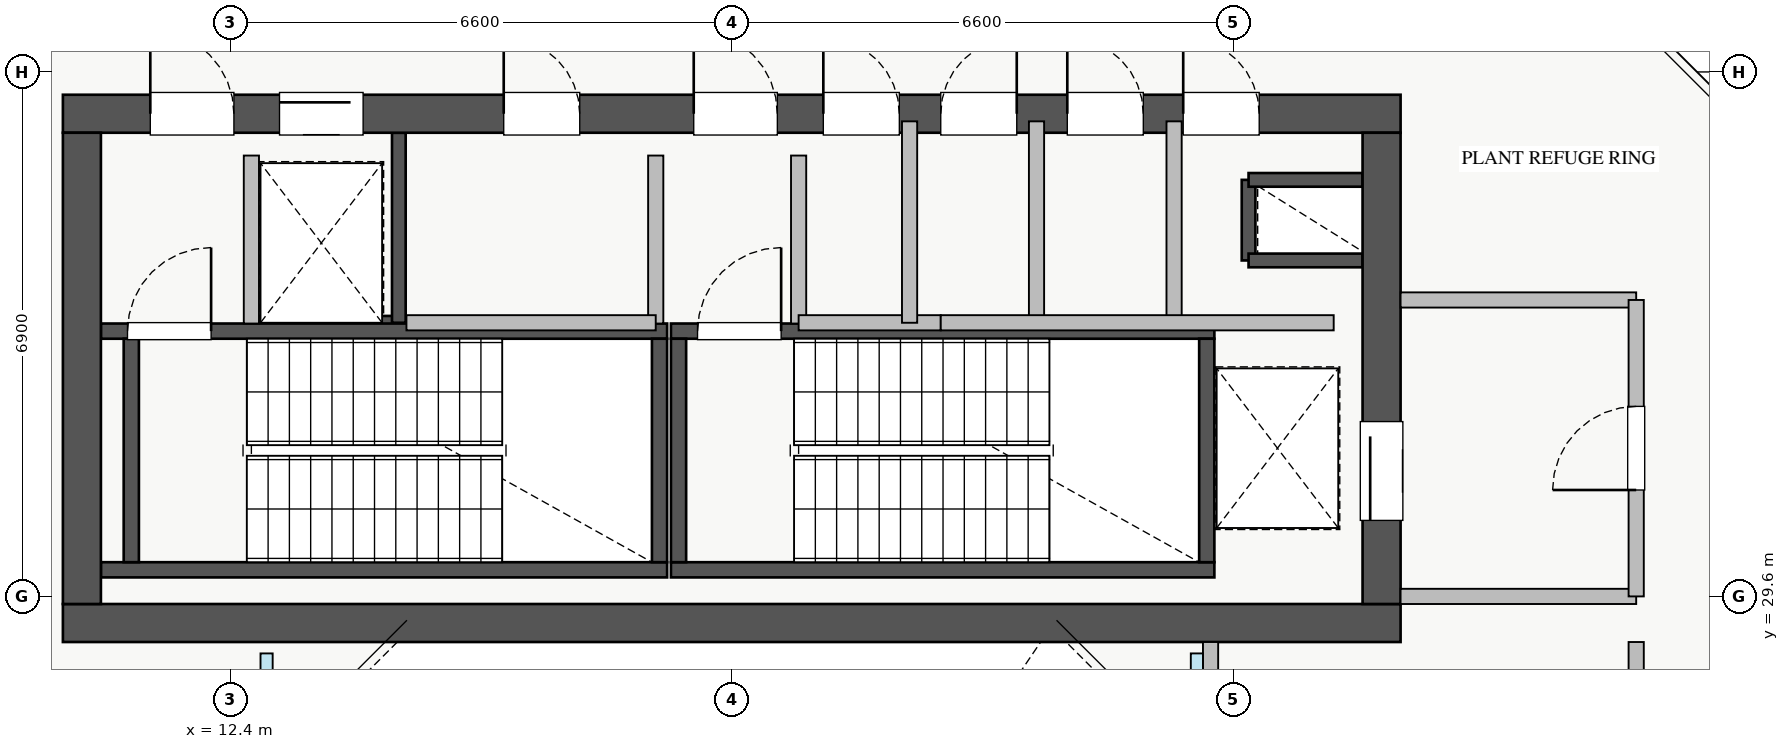
"""IFC4 building model, lengths in metres.
Left out: names, types, materials, properties, quantities, classifications, styles, units other than length and angle.
Written with IfcOpenShell. Run it as: python <this file> out.ifc"""

import sys

from ifc_helpers import new_model, si_unit, direction, frame, frame_2d, origin, place, context, subcontext, project, spatial, rectangle, extrude, source, transform, mapped, element, fill, save


model = new_model("IFC4")
c1 = context("Model", 3, precision=1e-05, world=origin(), true_north=direction((0.0, 1.0)))
c2 = subcontext(c1, "Body", "Model", "MODEL_VIEW")
j1 = project(units=[si_unit("LENGTHUNIT", "METRE"), si_unit("PLANEANGLEUNIT", "RADIAN")], contexts=[c1])
p1 = place(None, origin())
s1 = spatial("IfcSite", under=j1, at=p1, CompositionType="ELEMENT")
p2 = place(p1, origin())
s2 = spatial("IfcBuilding", under=s1, at=p2, CompositionType="ELEMENT")
p3 = place(p2, frame((0.0, 0.0, 232.75)))
s3 = spatial("IfcBuildingStorey", under=s2, at=p3, CompositionType="ELEMENT", Elevation=232.75)
p4 = place(p3, frame((12.68, 33.2, 0.0), z_axis=(0.0, 0.0, 1.0), x_axis=(1.0, 0.0, 0.0)))
e1 = element("IfcWall", 1, at=p4, inside=s3, PredefinedType="SHEAR", context=c2, shape_type="SweptSolid", body=[
    extrude(rectangle(XDim=1.94, YDim=0.18, at=frame_2d((0.97, 0.0))), origin(), (0.0, 0.0, 1.0), 4.32),
])
p5 = place(p3, frame((14.62, 33.2, 0.0), z_axis=(0.0, 0.0, 1.0), x_axis=(0.0, 1.0, 0.0)))
e2 = element("IfcWall", 2, at=p5, inside=s3, PredefinedType="SHEAR", context=c2, shape_type="SweptSolid", body=[
    extrude(rectangle(XDim=2.5, YDim=0.18, at=frame_2d((1.25, 0.0))), origin(), (0.0, 0.0, 1.0), 4.32),
])
p6 = place(p3, frame((25.8, 34.02, 0.0), z_axis=(0.0, 0.0, 1.0), x_axis=(0.0, 1.0, 0.0)))
e3 = element("IfcWall", 3, at=p6, inside=s3, PredefinedType="SHEAR", context=c2, shape_type="SweptSolid", body=[
    extrude(rectangle(XDim=1.06, YDim=0.18, at=frame_2d((0.53, 0.0))), origin(), (0.0, 0.0, 1.0), 4.32),
])
for number, where, z_axis, x_axis in (
    (4, (25.8, 35.08, 0.0), (0.0, 0.0, 1.0), (1.0, 0.0, 0.0)),
    (5, (25.8, 34.02, 0.0), (0.0, 0.0, 1.0), (1.0, 0.0, 0.0)),
):
    element("IfcWall", number, at=place(p3, frame(where, z_axis=z_axis, x_axis=x_axis)), inside=s3, PredefinedType="SHEAR", context=c2, shape_type="SweptSolid", body=[
        extrude(rectangle(XDim=1.5, YDim=0.18, at=frame_2d((0.75, 0.0))), origin(), (0.0, 0.0, 1.0), 4.32),
    ])
p7 = place(p3, frame((10.7, 29.95, 0.0), z_axis=(0.0, 0.0, 1.0), x_axis=(1.0, 0.0, 0.0)))
e6 = element("IfcWall", 6, at=p7, inside=s3, PredefinedType="SHEAR", context=c2, shape_type="SweptSolid", body=[
    extrude(rectangle(XDim=7.45, YDim=0.2, at=frame_2d((3.725, 0.0))), origin(), (0.0, 0.0, 1.0), 4.5),
])
p8 = place(p3, frame((10.7, 33.09, 0.0), z_axis=(0.0, 0.0, 1.0), x_axis=(1.0, 0.0, 0.0)))
e7 = element("IfcWall", 7, at=p8, inside=s3, PredefinedType="SHEAR", context=c2, shape_type="SweptSolid", body=[
    extrude(rectangle(XDim=7.45, YDim=0.2, at=frame_2d((3.725, 0.0))), origin(), (0.0, 0.0, 1.0), 4.5),
])
p9 = place(p8, frame((0.35, 0.0, 0.0)))
e8 = element("IfcOpeningElement", 8, at=p9, cuts=e7, PredefinedType="OPENING", context=c2, shape_type="SweptSolid", body=[
    extrude(rectangle(XDim=1.1, YDim=2.05, at=frame_2d((0.55, 1.025))), frame((0.0, 0.11, 0.0), z_axis=(0.0, -1.0, 0.0), x_axis=(1.0, 0.0, 0.0)), (0.0, 0.0, 1.0), 0.22),
])
for number, where, z_axis, x_axis in (
    (9, (11.1, 30.05, 0.0), (0.0, 0.0, 1.0), (0.0, 1.0, 0.0)),
    (10, (18.05, 30.05, 0.0), (0.0, 0.0, 1.0), (0.0, 1.0, 0.0)),
):
    element("IfcWall", number, at=place(p3, frame(where, z_axis=z_axis, x_axis=x_axis)), inside=s3, PredefinedType="SHEAR", context=c2, shape_type="SweptSolid", body=[
        extrude(rectangle(XDim=2.94, YDim=0.2, at=frame_2d((1.47, 0.0))), origin(), (0.0, 0.0, 1.0), 4.5),
    ])
p10 = place(p3, frame((18.2, 29.95, 0.0), z_axis=(0.0, 0.0, 1.0), x_axis=(1.0, 0.0, 0.0)))
e11 = element("IfcWall", 11, at=p10, inside=s3, PredefinedType="SHEAR", context=c2, shape_type="SweptSolid", body=[
    extrude(rectangle(XDim=7.15, YDim=0.2, at=frame_2d((3.575, 0.0))), origin(), (0.0, 0.0, 1.0), 4.5),
])
p11 = place(p3, frame((18.2, 33.09, 0.0), z_axis=(0.0, 0.0, 1.0), x_axis=(1.0, 0.0, 0.0)))
e12 = element("IfcWall", 12, at=p11, inside=s3, PredefinedType="SHEAR", context=c2, shape_type="SweptSolid", body=[
    extrude(rectangle(XDim=7.15, YDim=0.2, at=frame_2d((3.575, 0.0))), origin(), (0.0, 0.0, 1.0), 4.5),
])
p12 = place(p11, frame((0.35, 0.0, 0.0)))
e13 = element("IfcOpeningElement", 13, at=p12, cuts=e12, PredefinedType="OPENING", context=c2, shape_type="SweptSolid", body=[
    extrude(rectangle(XDim=1.1, YDim=2.05, at=frame_2d((0.55, 1.025))), frame((0.0, 0.11, 0.0), z_axis=(0.0, -1.0, 0.0), x_axis=(1.0, 0.0, 0.0)), (0.0, 0.0, 1.0), 0.22),
])
for number, where, z_axis, x_axis in (
    (14, (18.3, 30.05, 0.0), (0.0, 0.0, 1.0), (0.0, 1.0, 0.0)),
    (15, (25.25, 30.05, 0.0), (0.0, 0.0, 1.0), (0.0, 1.0, 0.0)),
):
    element("IfcWall", number, at=place(p3, frame(where, z_axis=z_axis, x_axis=x_axis)), inside=s3, PredefinedType="SHEAR", context=c2, shape_type="SweptSolid", body=[
        extrude(rectangle(XDim=2.94, YDim=0.2, at=frame_2d((1.47, 0.0))), origin(), (0.0, 0.0, 1.0), 4.5),
    ])
p13 = place(p3, frame((10.2, 29.25, 0.0), z_axis=(0.0, 0.0, 1.0), x_axis=(1.0, 0.0, 0.0)))
e16 = element("IfcWall", 16, at=p13, inside=s3, PredefinedType="SHEAR", context=c2, shape_type="SweptSolid", body=[
    extrude(rectangle(XDim=17.6, YDim=0.5, at=frame_2d((8.8, 0.0))), origin(), (0.0, 0.0, 1.0), 4.5),
])
p14 = place(p3, frame((10.2, 35.95, 0.0), z_axis=(0.0, 0.0, 1.0), x_axis=(1.0, 0.0, 0.0)))
e17 = element("IfcWall", 17, at=p14, inside=s3, PredefinedType="SHEAR", context=c2, shape_type="SweptSolid", body=[
    extrude(rectangle(XDim=17.6, YDim=0.5, at=frame_2d((8.8, 0.0))), origin(), (0.0, 0.0, 1.0), 4.5),
])
p15 = place(p14, frame((1.15, 0.0, 0.0)))
e18 = element("IfcOpeningElement", 18, at=p15, cuts=e17, PredefinedType="OPENING", context=c2, shape_type="SweptSolid", body=[
    extrude(rectangle(XDim=1.1, YDim=2.05, at=frame_2d((0.55, 1.025))), frame((0.0, 0.26, 0.0), z_axis=(0.0, -1.0, 0.0), x_axis=(1.0, 0.0, 0.0)), (0.0, 0.0, 1.0), 0.52),
])
p16 = place(p14, frame((8.3, 0.0, 0.0)))
e19 = element("IfcOpeningElement", 19, at=p16, cuts=e17, PredefinedType="OPENING", context=c2, shape_type="SweptSolid", body=[
    extrude(rectangle(XDim=1.1, YDim=2.05, at=frame_2d((0.55, 1.025))), frame((0.0, 0.26, 0.0), z_axis=(0.0, -1.0, 0.0), x_axis=(1.0, 0.0, 0.0)), (0.0, 0.0, 1.0), 0.52),
])
p17 = place(p14, frame((2.85, 0.0, 0.0)))
e20 = element("IfcOpeningElement", 20, at=p17, cuts=e17, PredefinedType="OPENING", context=c2, shape_type="SweptSolid", body=[
    extrude(rectangle(XDim=1.1, YDim=2.05, at=frame_2d((0.55, 1.025))), frame((0.0, 0.26, 0.0), z_axis=(0.0, -1.0, 0.0), x_axis=(1.0, 0.0, 0.0)), (0.0, 0.0, 1.0), 0.52),
])
p18 = place(p14, frame((5.8, 0.0, 0.0)))
e21 = element("IfcOpeningElement", 21, at=p18, cuts=e17, PredefinedType="OPENING", context=c2, shape_type="SweptSolid", body=[
    extrude(rectangle(XDim=1.0, YDim=2.05, at=frame_2d((0.5, 1.025))), frame((0.0, 0.26, 0.0), z_axis=(0.0, -1.0, 0.0), x_axis=(1.0, 0.0, 0.0)), (0.0, 0.0, 1.0), 0.52),
])
p19 = place(p14, frame((14.74, 0.0, 0.0)))
e22 = element("IfcOpeningElement", 22, at=p19, cuts=e17, PredefinedType="OPENING", context=c2, shape_type="SweptSolid", body=[
    extrude(rectangle(XDim=1.0, YDim=2.05, at=frame_2d((0.5, 1.025))), frame((0.0, 0.26, 0.0), z_axis=(0.0, -1.0, 0.0), x_axis=(1.0, 0.0, 0.0)), (0.0, 0.0, 1.0), 0.52),
])
p20 = place(p14, frame((10.005, 0.0, 0.0)))
e23 = element("IfcOpeningElement", 23, at=p20, cuts=e17, PredefinedType="OPENING", context=c2, shape_type="SweptSolid", body=[
    extrude(rectangle(XDim=1.0, YDim=2.05, at=frame_2d((0.5, 1.025))), frame((0.0, 0.26, 0.0), z_axis=(0.0, -1.0, 0.0), x_axis=(1.0, 0.0, 0.0)), (0.0, 0.0, 1.0), 0.52),
])
p21 = place(p14, frame((11.55, 0.0, 0.0)))
e24 = element("IfcOpeningElement", 24, at=p21, cuts=e17, PredefinedType="OPENING", context=c2, shape_type="SweptSolid", body=[
    extrude(rectangle(XDim=1.0, YDim=2.05, at=frame_2d((0.5, 1.025))), frame((0.0, 0.26, 0.0), z_axis=(0.0, -1.0, 0.0), x_axis=(1.0, 0.0, 0.0)), (0.0, 0.0, 1.0), 0.52),
])
p22 = place(p14, frame((13.215, 0.0, 0.0)))
e25 = element("IfcOpeningElement", 25, at=p22, cuts=e17, PredefinedType="OPENING", context=c2, shape_type="SweptSolid", body=[
    extrude(rectangle(XDim=1.0, YDim=2.05, at=frame_2d((0.5, 1.025))), frame((0.0, 0.26, 0.0), z_axis=(0.0, -1.0, 0.0), x_axis=(1.0, 0.0, 0.0)), (0.0, 0.0, 1.0), 0.52),
])
p23 = place(p3, frame((10.45, 29.5, 0.0), z_axis=(0.0, 0.0, 1.0), x_axis=(0.0, 1.0, 0.0)))
e26 = element("IfcWall", 26, at=p23, inside=s3, PredefinedType="SHEAR", context=c2, shape_type="SweptSolid", body=[
    extrude(rectangle(XDim=6.2, YDim=0.5, at=frame_2d((3.1, 0.0))), origin(), (0.0, 0.0, 1.0), 4.5),
])
p24 = place(p3, frame((27.55, 29.5, 0.0), z_axis=(0.0, 0.0, 1.0), x_axis=(0.0, 1.0, 0.0)))
e27 = element("IfcWall", 27, at=p24, inside=s3, PredefinedType="SHEAR", context=c2, shape_type="SweptSolid", body=[
    extrude(rectangle(XDim=6.2, YDim=0.5, at=frame_2d((3.1, 0.0))), origin(), (0.0, 0.0, 1.0), 4.5),
])
p25 = place(p24, frame((1.1, 0.0, 0.0)))
e28 = element("IfcOpeningElement", 28, at=p25, cuts=e27, PredefinedType="OPENING", context=c2, shape_type="SweptSolid", body=[
    extrude(rectangle(XDim=1.3, YDim=2.05, at=frame_2d((0.65, 1.025))), frame((0.0, 0.26, 0.0), z_axis=(0.0, -1.0, 0.0), x_axis=(1.0, 0.0, 0.0)), (0.0, 0.0, 1.0), 0.52),
])
p26 = place(p3, frame((27.8, 29.6, 0.0), z_axis=(0.0, 0.0, 1.0), x_axis=(1.0, 0.0, 0.0)))
e29 = element("IfcWall", 29, at=p26, inside=s3, PredefinedType="PARTITIONING", context=c2, shape_type="SweptSolid", body=[
    extrude(rectangle(XDim=3.1, YDim=0.2, at=frame_2d((1.55, 0.0))), origin(), (0.0, 0.0, 1.0), 4.32),
])
p27 = place(p3, frame((27.8, 33.5, 0.0), z_axis=(0.0, 0.0, 1.0), x_axis=(1.0, 0.0, 0.0)))
e30 = element("IfcWall", 30, at=p27, inside=s3, PredefinedType="PARTITIONING", context=c2, shape_type="SweptSolid", body=[
    extrude(rectangle(XDim=3.1, YDim=0.2, at=frame_2d((1.55, 0.0))), origin(), (0.0, 0.0, 1.0), 2.515),
])
p28 = place(p3, frame((30.9, 29.6, 0.0), z_axis=(0.0, 0.0, 1.0), x_axis=(0.0, 1.0, 0.0)))
e31 = element("IfcWall", 31, at=p28, inside=s3, PredefinedType="PARTITIONING", context=c2, shape_type="SweptSolid", body=[
    extrude(rectangle(XDim=3.9, YDim=0.2, at=frame_2d((1.95, 0.0))), origin(), (0.0, 0.0, 1.0), 4.32),
])
p29 = place(p28, frame((1.4, 0.0, 0.0)))
e32 = element("IfcOpeningElement", 32, at=p29, cuts=e31, PredefinedType="OPENING", context=c2, shape_type="SweptSolid", body=[
    extrude(rectangle(XDim=1.1, YDim=2.05, at=frame_2d((0.55, 1.025))), frame((0.0, 0.11, 0.0), z_axis=(0.0, -1.0, 0.0), x_axis=(1.0, 0.0, 0.0)), (0.0, 0.0, 1.0), 0.22),
])
for number, where, z_axis, x_axis in (
    (33, (12.68, 33.19, 0.0), (0.0, 0.0, 1.0), (0.0, 1.0, 0.0)),
    (34, (18.0, 33.19, 0.0), (0.0, 0.0, 1.0), (0.0, 1.0, 0.0)),
    (35, (19.88, 33.19, 0.0), (0.0, 0.0, 1.0), (0.0, 1.0, 0.0)),
):
    element("IfcWall", number, at=place(p3, frame(where, z_axis=z_axis, x_axis=x_axis)), inside=s3, PredefinedType="PARTITIONING", context=c2, shape_type="SweptSolid", body=[
        extrude(rectangle(XDim=2.21, YDim=0.2, at=frame_2d((1.105, 0.0))), origin(), (0.0, 0.0, 1.0), 4.32),
    ])
p30 = place(p3, frame((14.72, 33.2, 0.0), z_axis=(0.0, 0.0, 1.0), x_axis=(1.0, 0.0, 0.0)))
e36 = element("IfcWall", 36, at=p30, inside=s3, PredefinedType="PARTITIONING", context=c2, shape_type="SweptSolid", body=[
    extrude(rectangle(XDim=3.28, YDim=0.2, at=frame_2d((1.64, 0.0))), origin(), (0.0, 0.0, 1.0), 4.32),
])
p31 = place(p3, frame((24.82, 33.2, 0.0), z_axis=(0.0, 0.0, 1.0), x_axis=(0.0, 1.0, 0.0)))
e37 = element("IfcWall", 37, at=p31, inside=s3, PredefinedType="PARTITIONING", context=c2, shape_type="SweptSolid", body=[
    extrude(rectangle(XDim=2.65, YDim=0.2, at=frame_2d((1.325, 0.0))), origin(), (0.0, 0.0, 1.0), 4.32),
])
p32 = place(p3, frame((19.88, 33.2, 0.0), z_axis=(0.0, 0.0, 1.0), x_axis=(1.0, 0.0, 0.0)))
e38 = element("IfcWall", 38, at=p32, inside=s3, PredefinedType="PARTITIONING", context=c2, shape_type="SweptSolid", body=[
    extrude(rectangle(XDim=1.87, YDim=0.2, at=frame_2d((0.935, 0.0))), origin(), (0.0, 0.0, 1.0), 4.32),
])
for number, where, z_axis, x_axis in (
    (39, (21.34, 33.2, 0.0), (0.0, 0.0, 1.0), (0.0, 1.0, 0.0)),
    (40, (23.01, 33.2, 0.0), (0.0, 0.0, 1.0), (0.0, 1.0, 0.0)),
):
    element("IfcWall", number, at=place(p3, frame(where, z_axis=z_axis, x_axis=x_axis)), inside=s3, PredefinedType="PARTITIONING", context=c2, shape_type="SweptSolid", body=[
        extrude(rectangle(XDim=2.65, YDim=0.2, at=frame_2d((1.325, 0.0))), origin(), (0.0, 0.0, 1.0), 4.32),
    ])
p33 = place(p3, frame((21.75, 33.2, 0.0), z_axis=(0.0, 0.0, 1.0), x_axis=(1.0, 0.0, 0.0)))
e41 = element("IfcWall", 41, at=p33, inside=s3, PredefinedType="PARTITIONING", context=c2, shape_type="SweptSolid", body=[
    extrude(rectangle(XDim=5.17, YDim=0.2, at=frame_2d((2.585, 0.0))), origin(), (0.0, 0.0, 1.0), 4.32),
])
p34 = place(p3, frame((25.3, 17.0, 0.0), z_axis=(0.0, 0.0, 1.0), x_axis=(0.0, 1.0, 0.0)))
e42 = element("IfcWall", 42, at=p34, inside=s3, PredefinedType="PARTITIONING", context=c2, shape_type="SweptSolid", body=[
    extrude(rectangle(XDim=12.0, YDim=0.2, at=frame_2d((6.0, 0.0))), origin(), (0.0, 0.0, 1.0), 2.515),
])
p35 = place(p3, frame((30.9, 17.0, 0.0), z_axis=(0.0, 0.0, 1.0), x_axis=(0.0, 1.0, 0.0)))
e43 = element("IfcWall", 43, at=p35, inside=s3, PredefinedType="PARTITIONING", context=c2, shape_type="SweptSolid", body=[
    extrude(rectangle(XDim=12.0, YDim=0.2, at=frame_2d((6.0, 0.0))), origin(), (0.0, 0.0, 1.0), 4.32),
])
p36 = place(p35, frame((1.25, 0.0, 0.0)))
e44 = element("IfcOpeningElement", 44, at=p36, cuts=e43, PredefinedType="OPENING", context=c2, shape_type="SweptSolid", body=[
    extrude(rectangle(XDim=1.0, YDim=2.05, at=frame_2d((0.5, 1.025))), frame((0.0, 0.11, 0.0), z_axis=(0.0, -1.0, 0.0), x_axis=(1.0, 0.0, 0.0)), (0.0, 0.0, 1.0), 0.22),
])
p37 = place(p35, frame((7.25, 0.0, 0.0)))
e45 = element("IfcOpeningElement", 45, at=p37, cuts=e43, PredefinedType="OPENING", context=c2, shape_type="SweptSolid", body=[
    extrude(rectangle(XDim=1.0, YDim=2.05, at=frame_2d((0.5, 1.025))), frame((0.0, 0.11, 0.0), z_axis=(0.0, -1.0, 0.0), x_axis=(1.0, 0.0, 0.0)), (0.0, 0.0, 1.0), 0.22),
])
m1 = source(origin(), c2, "Body", "SweptSolid", [
    extrude(rectangle(XDim=1.3, YDim=2.05, at=frame_2d((0.65, 1.025))), frame((0.0, 0.025, 0.0), z_axis=(0.0, -1.0, 0.0), x_axis=(1.0, 0.0, 0.0)), (0.0, 0.0, 1.0), 0.05),
])
p38 = place(p25, origin())
e46 = element("IfcDoor", 46, at=p38, inside=s3, OperationType="SLIDING_TO_LEFT", PredefinedType="DOOR", context=c2, shape_type="MappedRepresentation", body=[
    mapped(m1, transform((0.0, 0.0, 0.0), x_axis=(1.0, 0.0, 0.0), y_axis=(0.0, 1.0, 0.0), z_axis=(0.0, 0.0, 1.0), scale=1.0)),
])
fill(e28, e46)
m2 = source(origin(), c2, "Body", "SweptSolid", [
    extrude(rectangle(XDim=1.1, YDim=2.05, at=frame_2d((0.55, 1.025))), frame((0.0, 0.025, 0.0), z_axis=(0.0, -1.0, 0.0), x_axis=(1.0, 0.0, 0.0)), (0.0, 0.0, 1.0), 0.05),
])
p39 = place(p15, origin())
e47 = element("IfcDoor", 47, at=p39, inside=s3, OperationType="SINGLE_SWING_LEFT", PredefinedType="DOOR", context=c2, shape_type="MappedRepresentation", body=[
    mapped(m2, transform((0.0, 0.0, 0.0), x_axis=(1.0, 0.0, 0.0), y_axis=(0.0, 1.0, 0.0), z_axis=(0.0, 0.0, 1.0), scale=1.0)),
])
fill(e18, e47)
p40 = place(p9, origin())
e48 = element("IfcDoor", 48, at=p40, inside=s3, OperationType="SINGLE_SWING_RIGHT", PredefinedType="DOOR", context=c2, shape_type="MappedRepresentation", body=[
    mapped(m2, transform((0.0, 0.0, 0.0), x_axis=(1.0, 0.0, 0.0), y_axis=(0.0, 1.0, 0.0), z_axis=(0.0, 0.0, 1.0), scale=1.0)),
])
fill(e8, e48)
p41 = place(p16, origin())
e49 = element("IfcDoor", 49, at=p41, inside=s3, OperationType="SINGLE_SWING_LEFT", PredefinedType="DOOR", context=c2, shape_type="MappedRepresentation", body=[
    mapped(m2, transform((0.0, 0.0, 0.0), x_axis=(1.0, 0.0, 0.0), y_axis=(0.0, 1.0, 0.0), z_axis=(0.0, 0.0, 1.0), scale=1.0)),
])
fill(e19, e49)
p42 = place(p12, origin())
e50 = element("IfcDoor", 50, at=p42, inside=s3, OperationType="SINGLE_SWING_RIGHT", PredefinedType="DOOR", context=c2, shape_type="MappedRepresentation", body=[
    mapped(m2, transform((0.0, 0.0, 0.0), x_axis=(1.0, 0.0, 0.0), y_axis=(0.0, 1.0, 0.0), z_axis=(0.0, 0.0, 1.0), scale=1.0)),
])
fill(e13, e50)
p43 = place(p17, origin())
e51 = element("IfcDoor", 51, at=p43, inside=s3, OperationType="SLIDING_TO_LEFT", PredefinedType="DOOR", context=c2, shape_type="MappedRepresentation", body=[
    mapped(m2, transform((0.0, 0.0, 0.0), x_axis=(1.0, 0.0, 0.0), y_axis=(0.0, 1.0, 0.0), z_axis=(0.0, 0.0, 1.0), scale=1.0)),
])
fill(e20, e51)
m3 = source(origin(), c2, "Body", "SweptSolid", [
    extrude(rectangle(XDim=1.0, YDim=2.05, at=frame_2d((0.5, 1.025))), frame((0.0, 0.025, 0.0), z_axis=(0.0, -1.0, 0.0), x_axis=(1.0, 0.0, 0.0)), (0.0, 0.0, 1.0), 0.05),
])
p44 = place(p18, origin())
e52 = element("IfcDoor", 52, at=p44, inside=s3, OperationType="SINGLE_SWING_LEFT", PredefinedType="DOOR", context=c2, shape_type="MappedRepresentation", body=[
    mapped(m3, transform((0.0, 0.0, 0.0), x_axis=(1.0, 0.0, 0.0), y_axis=(0.0, 1.0, 0.0), z_axis=(0.0, 0.0, 1.0), scale=1.0)),
])
fill(e21, e52)
p45 = place(p19, origin())
e53 = element("IfcDoor", 53, at=p45, inside=s3, OperationType="SINGLE_SWING_LEFT", PredefinedType="DOOR", context=c2, shape_type="MappedRepresentation", body=[
    mapped(m3, transform((0.0, 0.0, 0.0), x_axis=(1.0, 0.0, 0.0), y_axis=(0.0, 1.0, 0.0), z_axis=(0.0, 0.0, 1.0), scale=1.0)),
])
fill(e22, e53)
p46 = place(p20, origin())
e54 = element("IfcDoor", 54, at=p46, inside=s3, OperationType="SINGLE_SWING_LEFT", PredefinedType="DOOR", context=c2, shape_type="MappedRepresentation", body=[
    mapped(m3, transform((0.0, 0.0, 0.0), x_axis=(1.0, 0.0, 0.0), y_axis=(0.0, 1.0, 0.0), z_axis=(0.0, 0.0, 1.0), scale=1.0)),
])
fill(e23, e54)
p47 = place(p21, origin())
e55 = element("IfcDoor", 55, at=p47, inside=s3, OperationType="SINGLE_SWING_RIGHT", PredefinedType="DOOR", context=c2, shape_type="MappedRepresentation", body=[
    mapped(m3, transform((0.0, 0.0, 0.0), x_axis=(1.0, 0.0, 0.0), y_axis=(0.0, 1.0, 0.0), z_axis=(0.0, 0.0, 1.0), scale=1.0)),
])
fill(e24, e55)
p48 = place(p22, origin())
e56 = element("IfcDoor", 56, at=p48, inside=s3, OperationType="SINGLE_SWING_LEFT", PredefinedType="DOOR", context=c2, shape_type="MappedRepresentation", body=[
    mapped(m3, transform((0.0, 0.0, 0.0), x_axis=(1.0, 0.0, 0.0), y_axis=(0.0, 1.0, 0.0), z_axis=(0.0, 0.0, 1.0), scale=1.0)),
])
fill(e25, e56)
p49 = place(p29, origin())
e57 = element("IfcDoor", 57, at=p49, inside=s3, OperationType="SINGLE_SWING_LEFT", PredefinedType="DOOR", context=c2, shape_type="MappedRepresentation", body=[
    mapped(m2, transform((0.0, 0.0, 0.0), x_axis=(1.0, 0.0, 0.0), y_axis=(0.0, 1.0, 0.0), z_axis=(0.0, 0.0, 1.0), scale=1.0)),
])
fill(e32, e57)
save(model, sys.argv[1])
